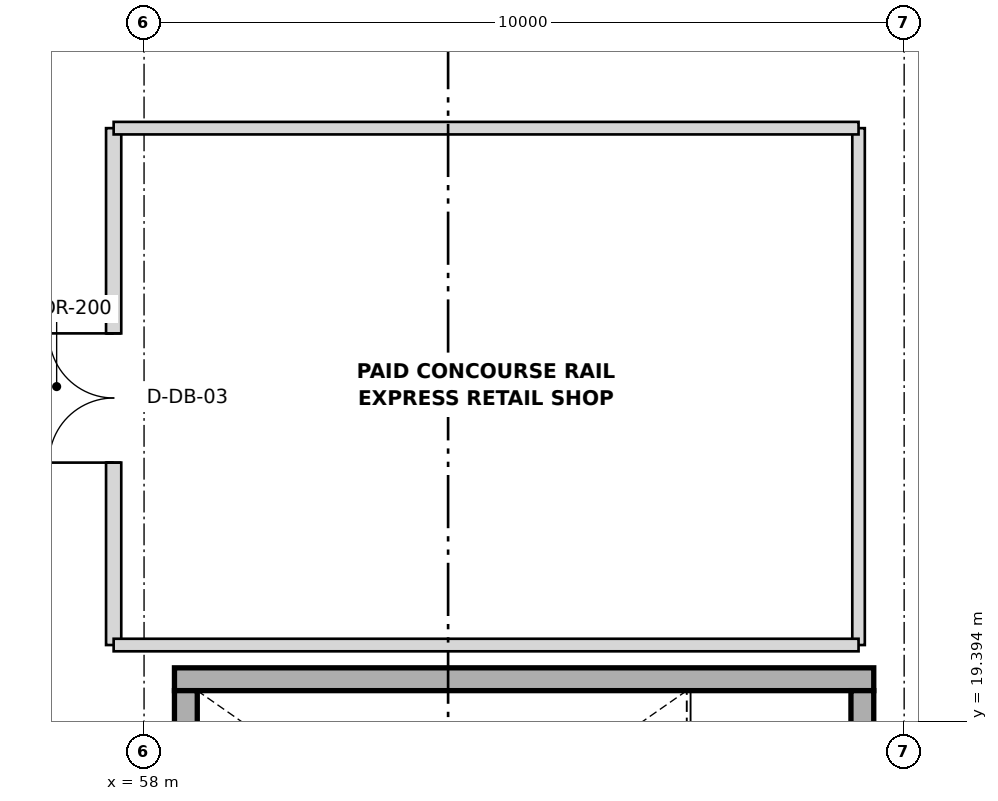
"""IFC4 building model, lengths in metres.
Left out: names, types, materials, properties, quantities, classifications, styles, units other than length and angle.
Written with IfcOpenShell. Run it as: python <this file> out.ifc"""

import sys

from ifc_helpers import new_model, si_unit, direction, frame, frame_2d, origin, place, context, subcontext, project, spatial, rectangle, extrude, element, fill, save


model = new_model("IFC4")
c1 = context("Model", 3, precision=1e-05, world=origin(), true_north=direction((0.0, 1.0)))
c2 = subcontext(c1, "Body", "Model", "MODEL_VIEW")
j1 = project(units=[si_unit("LENGTHUNIT", "METRE"), si_unit("PLANEANGLEUNIT", "RADIAN")], contexts=[c1])
p1 = place(None, origin())
s1 = spatial("IfcSite", under=j1, at=p1, CompositionType="ELEMENT")
p2 = place(p1, origin())
s2 = spatial("IfcBuilding", under=s1, at=p2, CompositionType="ELEMENT")
p3 = place(p2, frame((0.0, 0.0, 9.6)))
s3 = spatial("IfcBuildingStorey", under=s2, at=p3, CompositionType="ELEMENT", Elevation=9.6)
p4 = place(p3, frame((58.4, 19.95, 0.0), z_axis=(0.0, 0.0, 1.0), x_axis=(1.0, 0.0, 0.0)))
e1 = element("IfcWall", 1, at=p4, inside=s3, PredefinedType="SHEAR", context=c2, shape_type="SweptSolid", body=[
    extrude(rectangle(XDim=9.2, YDim=0.3, at=frame_2d((4.6, 0.0))), origin(), (0.0, 0.0, 1.0), 4.52),
])
p5 = place(p3, frame((67.45, 19.8, 0.0), z_axis=(0.0, 0.0, 1.0), x_axis=(0.0, -1.0, 0.0)))
e2 = element("IfcWall", 2, at=p5, inside=s3, PredefinedType="SHEAR", context=c2, shape_type="SweptSolid", body=[
    extrude(rectangle(XDim=4.5, YDim=0.3, at=frame_2d((2.25, 0.0))), origin(), (0.0, 0.0, 1.0), 4.52),
])
p6 = place(p5, frame((1.575, 0.0, 0.0)))
e3 = element("IfcOpeningElement", 3, at=p6, cuts=e2, PredefinedType="OPENING", context=c2, shape_type="SweptSolid", body=[
    extrude(rectangle(XDim=1.35, YDim=2.15, at=frame_2d((0.675, 1.075))), frame((0.0, 0.16, 0.0), z_axis=(0.0, -1.0, 0.0), x_axis=(1.0, 0.0, 0.0)), (0.0, 0.0, 1.0), 0.32),
])
p7 = place(p3, frame((58.55, 15.3, 0.0), z_axis=(0.0, 0.0, 1.0), x_axis=(0.0, 1.0, 0.0)))
e4 = element("IfcWall", 4, at=p7, inside=s3, PredefinedType="SHEAR", context=c2, shape_type="SweptSolid", body=[
    extrude(rectangle(XDim=4.5, YDim=0.3, at=frame_2d((2.25, 0.0))), origin(), (0.0, 0.0, 1.0), 4.52),
])
p8 = place(p3, frame((57.6, 20.4, 0.0), z_axis=(0.0, 0.0, 1.0), x_axis=(0.0, 1.0, 0.0)))
e5 = element("IfcWall", 5, at=p8, inside=s3, PredefinedType="PARTITIONING", context=c2, shape_type="SweptSolid", body=[
    extrude(rectangle(XDim=6.8, YDim=0.2, at=frame_2d((3.4, 0.0))), origin(), (0.0, 0.0, 1.0), 3.55),
])
p9 = place(p8, frame((2.4, 0.0, 0.0)))
e6 = element("IfcOpeningElement", 6, at=p9, cuts=e5, PredefinedType="OPENING", context=c2, shape_type="SweptSolid", body=[
    extrude(rectangle(XDim=1.7, YDim=2.2, at=frame_2d((0.85, 1.1))), frame((0.0, 0.11, 0.0), z_axis=(0.0, -1.0, 0.0), x_axis=(1.0, 0.0, 0.0)), (0.0, 0.0, 1.0), 0.22),
])
p10 = place(p3, frame((67.4, 20.4, 0.0), z_axis=(0.0, 0.0, 1.0), x_axis=(0.0, 1.0, 0.0)))
e7 = element("IfcWall", 7, at=p10, inside=s3, PredefinedType="PARTITIONING", context=c2, shape_type="SweptSolid", body=[
    extrude(rectangle(XDim=6.8, YDim=0.165, at=frame_2d((3.4, 0.0))), origin(), (0.0, 0.0, 1.0), 3.55),
])
for number, where, z_axis, x_axis in (
    (8, (57.6, 20.4, 0.0), (0.0, 0.0, 1.0), (1.0, 0.0, 0.0)),
    (9, (57.6, 27.2, 0.0), (0.0, 0.0, 1.0), (1.0, 0.0, 0.0)),
):
    element("IfcWall", number, at=place(p3, frame(where, z_axis=z_axis, x_axis=x_axis)), inside=s3, PredefinedType="PARTITIONING", context=c2, shape_type="SweptSolid", body=[
        extrude(rectangle(XDim=9.8, YDim=0.165, at=frame_2d((4.9, 0.0))), origin(), (0.0, 0.0, 1.0), 3.55),
    ])
p11 = place(p9, origin())
e10 = element("IfcDoor", 10, at=p11, inside=s3, OperationType="DOUBLE_DOOR_SINGLE_SWING", PredefinedType="DOOR", context=c2, shape_type="SweptSolid", body=[
    extrude(rectangle(XDim=1.7, YDim=2.2, at=frame_2d((0.85, 1.1))), frame((0.0, 0.025, 0.0), z_axis=(0.0, -1.0, 0.0), x_axis=(1.0, 0.0, 0.0)), (0.0, 0.0, 1.0), 0.05),
])
fill(e6, e10)
save(model, sys.argv[1])
